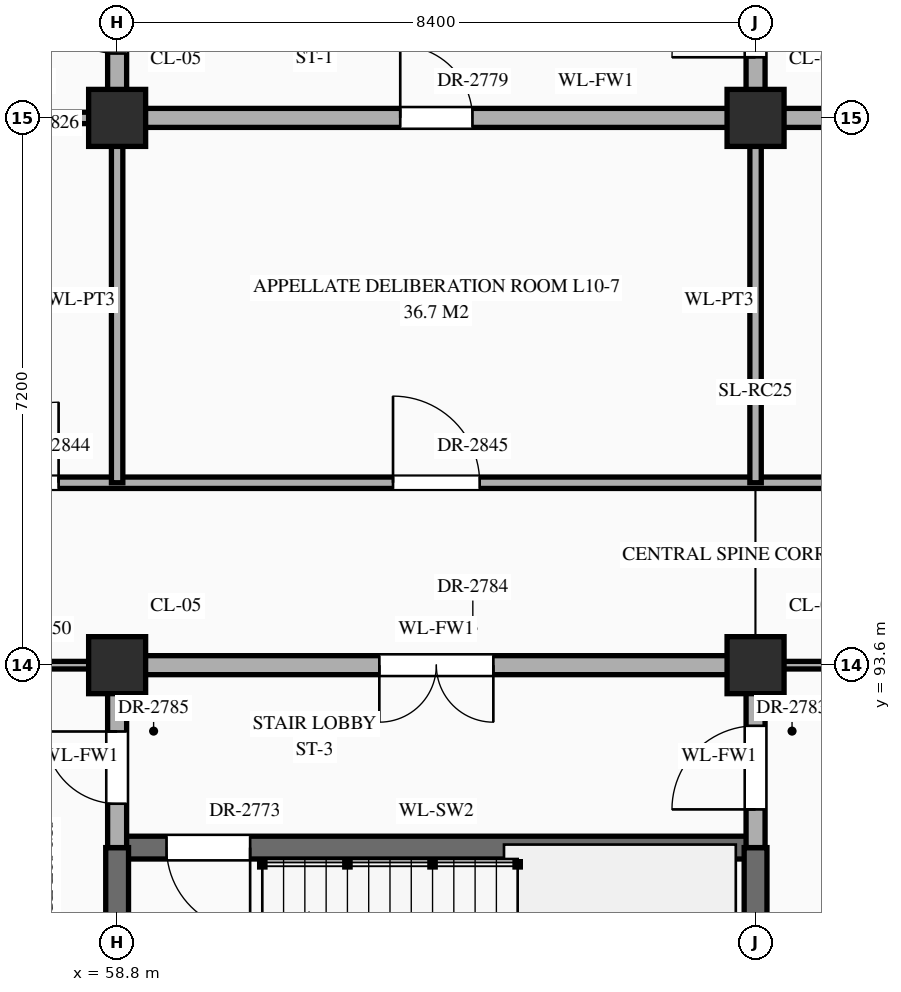
"""IFC4 building model, lengths in metres.
Left out: names, types, materials, properties, quantities, classifications, styles, units other than length and angle.
Written with IfcOpenShell. Run it as: python <this file> out.ifc"""

import sys

from ifc_helpers import new_model, si_unit, direction, frame, frame_2d, origin, origin_2d, place, context, subcontext, project, spatial, rectangle, extrude, element, fill, save


model = new_model("IFC4")
c1 = context("Model", 3, precision=1e-05, world=origin(), true_north=direction((0.0, 1.0)))
c2 = subcontext(c1, "Body", "Model", "MODEL_VIEW")
j1 = project(units=[si_unit("LENGTHUNIT", "METRE"), si_unit("PLANEANGLEUNIT", "RADIAN")], contexts=[c1])
p1 = place(None, origin())
s1 = spatial("IfcSite", under=j1, at=p1, CompositionType="ELEMENT")
p2 = place(p1, origin())
s2 = spatial("IfcBuilding", under=s1, at=p2, CompositionType="ELEMENT")
p3 = place(p2, frame((0.0, 0.0, 43.5)))
s3 = spatial("IfcBuildingStorey", under=s2, at=p3, CompositionType="ELEMENT", Elevation=43.5)
for number, where, z_axis, x_axis in (
    (1, (58.8, 93.6, 0.0), (0.0, 0.0, 1.0), (1.0, 0.0, 0.0)),
    (2, (58.8, 100.8, 0.0), (0.0, 0.0, 1.0), (1.0, 0.0, 0.0)),
    (3, (67.2, 93.6, 0.0), (0.0, 0.0, 1.0), (1.0, 0.0, 0.0)),
    (4, (67.2, 100.8, 0.0), (0.0, 0.0, 1.0), (1.0, 0.0, 0.0)),
):
    element("IfcColumn", number, at=place(p3, frame(where, z_axis=z_axis, x_axis=x_axis)), inside=s3, PredefinedType="COLUMN", context=c2, shape_type="SweptSolid", body=[
        extrude(rectangle(XDim=0.75, YDim=0.75, at=origin_2d()), origin(), (0.0, 0.0, 1.0), 4.2),
    ])
p4 = place(p3, frame((58.8, 91.2, 0.0), z_axis=(0.0, 0.0, 1.0), x_axis=(1.0, 0.0, 0.0)))
e5 = element("IfcWall", 5, at=p4, inside=s3, PredefinedType="SHEAR", context=c2, shape_type="SweptSolid", body=[
    extrude(rectangle(XDim=8.4, YDim=0.3, at=frame_2d((4.2, 0.0))), origin(), (0.0, 0.0, 1.0), 3.95),
])
p5 = place(p4, frame((0.65, 0.0, 0.0)))
e6 = element("IfcOpeningElement", 6, at=p5, cuts=e5, PredefinedType="OPENING", context=c2, shape_type="SweptSolid", body=[
    extrude(rectangle(XDim=1.1, YDim=2.2, at=frame_2d((0.55, 1.1))), frame((0.0, 0.162, 0.0), z_axis=(0.0, -1.0, 0.0), x_axis=(1.0, 0.0, 0.0)), (0.0, 0.0, 1.0), 0.324),
])
p6 = place(p3, frame((50.4, 93.6, 0.0), z_axis=(0.0, 0.0, 1.0), x_axis=(1.0, 0.0, 0.0)))
e7 = element("IfcWall", 7, at=p6, inside=s3, PredefinedType="STANDARD", context=c2, shape_type="SweptSolid", body=[
    extrude(rectangle(XDim=8.4, YDim=0.1, at=frame_2d((4.2, 0.0))), origin(), (0.0, 0.0, 1.0), 3.1),
])
p7 = place(p6, frame((1.087, 0.0, 0.0)))
e8 = element("IfcOpeningElement", 8, at=p7, cuts=e7, PredefinedType="OPENING", context=c2, shape_type="SweptSolid", body=[
    extrude(rectangle(XDim=0.92, YDim=2.15, at=frame_2d((0.46, 1.075))), frame((0.0, 0.062, 0.0), z_axis=(0.0, -1.0, 0.0), x_axis=(1.0, 0.0, 0.0)), (0.0, 0.0, 1.0), 0.124),
])
p8 = place(p6, frame((3.72, 0.0, 0.0)))
e9 = element("IfcOpeningElement", 9, at=p8, cuts=e7, PredefinedType="OPENING", context=c2, shape_type="SweptSolid", body=[
    extrude(rectangle(XDim=0.96, YDim=2.2, at=frame_2d((0.48, 1.1))), frame((0.0, 0.062, 0.0), z_axis=(0.0, -1.0, 0.0), x_axis=(1.0, 0.0, 0.0)), (0.0, 0.0, 1.0), 0.124),
])
p9 = place(p6, frame((6.353, 0.0, 0.0)))
e10 = element("IfcOpeningElement", 10, at=p9, cuts=e7, PredefinedType="OPENING", context=c2, shape_type="SweptSolid", body=[
    extrude(rectangle(XDim=1.0, YDim=2.25, at=frame_2d((0.5, 1.125))), frame((0.0, 0.062, 0.0), z_axis=(0.0, -1.0, 0.0), x_axis=(1.0, 0.0, 0.0)), (0.0, 0.0, 1.0), 0.124),
])
p10 = place(p3, frame((58.8, 93.6, 0.0), z_axis=(0.0, 0.0, 1.0), x_axis=(1.0, 0.0, 0.0)))
e11 = element("IfcWall", 11, at=p10, inside=s3, PredefinedType="STANDARD", context=c2, shape_type="SweptSolid", body=[
    extrude(rectangle(XDim=8.4, YDim=0.25, at=frame_2d((4.2, 0.0))), origin(), (0.0, 0.0, 1.0), 3.1),
])
p11 = place(p10, frame((3.45, 0.0, 0.0)))
e12 = element("IfcOpeningElement", 12, at=p11, cuts=e11, PredefinedType="OPENING", context=c2, shape_type="SweptSolid", body=[
    extrude(rectangle(XDim=1.5, YDim=2.25, at=frame_2d((0.75, 1.125))), frame((0.0, 0.137, 0.0), z_axis=(0.0, -1.0, 0.0), x_axis=(1.0, 0.0, 0.0)), (0.0, 0.0, 1.0), 0.274),
])
p12 = place(p3, frame((67.2, 93.6, 0.0), z_axis=(0.0, 0.0, 1.0), x_axis=(1.0, 0.0, 0.0)))
e13 = element("IfcWall", 13, at=p12, inside=s3, PredefinedType="STANDARD", context=c2, shape_type="SweptSolid", body=[
    extrude(rectangle(XDim=33.6, YDim=0.1, at=frame_2d((16.8, 0.0))), origin(), (0.0, 0.0, 1.0), 3.1),
])
p13 = place(p12, frame((3.35, 0.0, 0.0)))
e14 = element("IfcOpeningElement", 14, at=p13, cuts=e13, PredefinedType="OPENING", context=c2, shape_type="SweptSolid", body=[
    extrude(rectangle(XDim=1.7, YDim=2.45, at=frame_2d((0.85, 1.225))), frame((0.0, 0.062, 0.0), z_axis=(0.0, -1.0, 0.0), x_axis=(1.0, 0.0, 0.0)), (0.0, 0.0, 1.0), 0.124),
])
p14 = place(p12, frame((28.675, 0.0, 0.0)))
e15 = element("IfcOpeningElement", 15, at=p14, cuts=e13, PredefinedType="OPENING", context=c2, shape_type="SweptSolid", body=[
    extrude(rectangle(XDim=1.45, YDim=2.3, at=frame_2d((0.725, 1.15))), frame((0.0, 0.062, 0.0), z_axis=(0.0, -1.0, 0.0), x_axis=(1.0, 0.0, 0.0)), (0.0, 0.0, 1.0), 0.124),
])
p15 = place(p12, frame((11.75, 0.0, 0.0)))
e16 = element("IfcOpeningElement", 16, at=p15, cuts=e13, PredefinedType="OPENING", context=c2, shape_type="SweptSolid", body=[
    extrude(rectangle(XDim=1.7, YDim=2.45, at=frame_2d((0.85, 1.225))), frame((0.0, 0.062, 0.0), z_axis=(0.0, -1.0, 0.0), x_axis=(1.0, 0.0, 0.0)), (0.0, 0.0, 1.0), 0.124),
])
p16 = place(p12, frame((17.837, 0.0, 0.0)))
e17 = element("IfcOpeningElement", 17, at=p16, cuts=e13, PredefinedType="OPENING", context=c2, shape_type="SweptSolid", body=[
    extrude(rectangle(XDim=1.02, YDim=2.4, at=frame_2d((0.51, 1.2))), frame((0.0, 0.062, 0.0), z_axis=(0.0, -1.0, 0.0), x_axis=(1.0, 0.0, 0.0)), (0.0, 0.0, 1.0), 0.124),
])
p17 = place(p12, frame((20.47, 0.0, 0.0)))
e18 = element("IfcOpeningElement", 18, at=p17, cuts=e13, PredefinedType="OPENING", context=c2, shape_type="SweptSolid", body=[
    extrude(rectangle(XDim=1.06, YDim=2.4, at=frame_2d((0.53, 1.2))), frame((0.0, 0.062, 0.0), z_axis=(0.0, -1.0, 0.0), x_axis=(1.0, 0.0, 0.0)), (0.0, 0.0, 1.0), 0.124),
])
p18 = place(p12, frame((23.083, 0.0, 0.0)))
e19 = element("IfcOpeningElement", 19, at=p18, cuts=e13, PredefinedType="OPENING", context=c2, shape_type="SweptSolid", body=[
    extrude(rectangle(XDim=1.14, YDim=2.4, at=frame_2d((0.57, 1.2))), frame((0.0, 0.062, 0.0), z_axis=(0.0, -1.0, 0.0), x_axis=(1.0, 0.0, 0.0)), (0.0, 0.0, 1.0), 0.124),
])
p19 = place(p3, frame((56.2, 96.0, 0.0), z_axis=(0.0, 0.0, 1.0), x_axis=(1.0, 0.0, 0.0)))
e20 = element("IfcWall", 20, at=p19, inside=s3, PredefinedType="STANDARD", context=c2, shape_type="SweptSolid", body=[
    extrude(rectangle(XDim=27.8, YDim=0.15, at=frame_2d((13.9, 0.0))), origin(), (0.0, 0.0, 1.0), 3.95),
])
p20 = place(p19, frame((0.77, 0.0, 0.0)))
e21 = element("IfcOpeningElement", 21, at=p20, cuts=e20, PredefinedType="OPENING", context=c2, shape_type="SweptSolid", body=[
    extrude(rectangle(XDim=1.06, YDim=2.4, at=frame_2d((0.53, 1.2))), frame((0.0, 0.087, 0.0), z_axis=(0.0, -1.0, 0.0), x_axis=(1.0, 0.0, 0.0)), (0.0, 0.0, 1.0), 0.174),
])
p21 = place(p19, frame((6.23, 0.0, 0.0)))
e22 = element("IfcOpeningElement", 22, at=p21, cuts=e20, PredefinedType="OPENING", context=c2, shape_type="SweptSolid", body=[
    extrude(rectangle(XDim=1.14, YDim=2.4, at=frame_2d((0.57, 1.2))), frame((0.0, 0.087, 0.0), z_axis=(0.0, -1.0, 0.0), x_axis=(1.0, 0.0, 0.0)), (0.0, 0.0, 1.0), 0.174),
])
p22 = place(p19, frame((14.75, 0.0, 0.0)))
e23 = element("IfcOpeningElement", 23, at=p22, cuts=e20, PredefinedType="OPENING", context=c2, shape_type="SweptSolid", body=[
    extrude(rectangle(XDim=0.9, YDim=2.15, at=frame_2d((0.45, 1.075))), frame((0.0, 0.087, 0.0), z_axis=(0.0, -1.0, 0.0), x_axis=(1.0, 0.0, 0.0)), (0.0, 0.0, 1.0), 0.174),
])
p23 = place(p19, frame((23.17, 0.0, 0.0)))
e24 = element("IfcOpeningElement", 24, at=p23, cuts=e20, PredefinedType="OPENING", context=c2, shape_type="SweptSolid", body=[
    extrude(rectangle(XDim=0.86, YDim=2.1, at=frame_2d((0.43, 1.05))), frame((0.0, 0.087, 0.0), z_axis=(0.0, -1.0, 0.0), x_axis=(1.0, 0.0, 0.0)), (0.0, 0.0, 1.0), 0.174),
])
p24 = place(p3, frame((56.2, 100.8, 0.0), z_axis=(0.0, 0.0, 1.0), x_axis=(1.0, 0.0, 0.0)))
e25 = element("IfcWall", 25, at=p24, inside=s3, PredefinedType="STANDARD", context=c2, shape_type="SweptSolid", body=[
    extrude(rectangle(XDim=2.6, YDim=0.15, at=frame_2d((1.3, 0.0))), origin(), (0.0, 0.0, 1.0), 3.1),
])
p25 = place(p24, frame((0.643, 0.0, 0.0)))
e26 = element("IfcOpeningElement", 26, at=p25, cuts=e25, PredefinedType="OPENING", context=c2, shape_type="SweptSolid", body=[
    extrude(rectangle(XDim=1.02, YDim=2.4, at=frame_2d((0.51, 1.2))), frame((0.0, 0.087, 0.0), z_axis=(0.0, -1.0, 0.0), x_axis=(1.0, 0.0, 0.0)), (0.0, 0.0, 1.0), 0.174),
])
p26 = place(p3, frame((58.8, 100.8, 0.0), z_axis=(0.0, 0.0, 1.0), x_axis=(1.0, 0.0, 0.0)))
e27 = element("IfcWall", 27, at=p26, inside=s3, PredefinedType="STANDARD", context=c2, shape_type="SweptSolid", body=[
    extrude(rectangle(XDim=12.6, YDim=0.25, at=frame_2d((6.3, 0.0))), origin(), (0.0, 0.0, 1.0), 3.1),
])
p27 = place(p26, frame((3.725, 0.0, 0.0)))
e28 = element("IfcOpeningElement", 28, at=p27, cuts=e27, PredefinedType="OPENING", context=c2, shape_type="SweptSolid", body=[
    extrude(rectangle(XDim=0.95, YDim=2.15, at=frame_2d((0.475, 1.075))), frame((0.0, 0.137, 0.0), z_axis=(0.0, -1.0, 0.0), x_axis=(1.0, 0.0, 0.0)), (0.0, 0.0, 1.0), 0.274),
])
p28 = place(p3, frame((58.8, 86.4, 0.0), z_axis=(0.0, 0.0, 1.0), x_axis=(0.0, 1.0, 0.0)))
e29 = element("IfcWall", 29, at=p28, inside=s3, PredefinedType="SHEAR", context=c2, shape_type="SweptSolid", body=[
    extrude(rectangle(XDim=4.8, YDim=0.3, at=frame_2d((2.4, 0.0))), origin(), (0.0, 0.0, 1.0), 3.95),
])
p29 = place(p3, frame((58.8, 91.2, 0.0), z_axis=(0.0, 0.0, 1.0), x_axis=(0.0, 1.0, 0.0)))
e30 = element("IfcWall", 30, at=p29, inside=s3, PredefinedType="STANDARD", context=c2, shape_type="SweptSolid", body=[
    extrude(rectangle(XDim=2.4, YDim=0.25, at=frame_2d((1.2, 0.0))), origin(), (0.0, 0.0, 1.0), 3.2),
])
p30 = place(p29, frame((0.577, 0.0, 0.0)))
e31 = element("IfcOpeningElement", 31, at=p30, cuts=e30, PredefinedType="OPENING", context=c2, shape_type="SweptSolid", body=[
    extrude(rectangle(XDim=0.95, YDim=2.15, at=frame_2d((0.475, 1.075))), frame((0.0, 0.137, 0.0), z_axis=(0.0, -1.0, 0.0), x_axis=(1.0, 0.0, 0.0)), (0.0, 0.0, 1.0), 0.274),
])
p31 = place(p3, frame((58.8, 96.0, 0.0), z_axis=(0.0, 0.0, 1.0), x_axis=(0.0, 1.0, 0.0)))
e32 = element("IfcWall", 32, at=p31, inside=s3, PredefinedType="STANDARD", context=c2, shape_type="SweptSolid", body=[
    extrude(rectangle(XDim=4.8, YDim=0.15, at=frame_2d((2.4, 0.0))), origin(), (0.0, 0.0, 1.0), 3.2),
])
p32 = place(p3, frame((58.8, 100.8, 0.0), z_axis=(0.0, 0.0, 1.0), x_axis=(0.0, 1.0, 0.0)))
e33 = element("IfcWall", 33, at=p32, inside=s3, PredefinedType="STANDARD", context=c2, shape_type="SweptSolid", body=[
    extrude(rectangle(XDim=2.4, YDim=0.25, at=frame_2d((1.2, 0.0))), origin(), (0.0, 0.0, 1.0), 3.2),
])
p33 = place(p32, frame((0.847, 0.0, 0.0)))
e34 = element("IfcOpeningElement", 34, at=p33, cuts=e33, PredefinedType="OPENING", context=c2, shape_type="SweptSolid", body=[
    extrude(rectangle(XDim=1.0, YDim=2.2, at=frame_2d((0.5, 1.1))), frame((0.0, 0.137, 0.0), z_axis=(0.0, -1.0, 0.0), x_axis=(1.0, 0.0, 0.0)), (0.0, 0.0, 1.0), 0.274),
])
p34 = place(p3, frame((67.2, 89.2, 0.0), z_axis=(0.0, 0.0, 1.0), x_axis=(0.0, 1.0, 0.0)))
e35 = element("IfcWall", 35, at=p34, inside=s3, PredefinedType="SHEAR", context=c2, shape_type="SweptSolid", body=[
    extrude(rectangle(XDim=2.0, YDim=0.3, at=frame_2d((1.0, 0.0))), origin(), (0.0, 0.0, 1.0), 3.95),
])
p35 = place(p3, frame((67.2, 91.2, 0.0), z_axis=(0.0, 0.0, 1.0), x_axis=(0.0, 1.0, 0.0)))
e36 = element("IfcWall", 36, at=p35, inside=s3, PredefinedType="STANDARD", context=c2, shape_type="SweptSolid", body=[
    extrude(rectangle(XDim=2.4, YDim=0.25, at=frame_2d((1.2, 0.0))), origin(), (0.0, 0.0, 1.0), 3.2),
])
p36 = place(p35, frame((0.502, 0.0, 0.0)))
e37 = element("IfcOpeningElement", 37, at=p36, cuts=e36, PredefinedType="OPENING", context=c2, shape_type="SweptSolid", body=[
    extrude(rectangle(XDim=1.1, YDim=2.2, at=frame_2d((0.55, 1.1))), frame((0.0, 0.137, 0.0), z_axis=(0.0, -1.0, 0.0), x_axis=(1.0, 0.0, 0.0)), (0.0, 0.0, 1.0), 0.274),
])
p37 = place(p3, frame((67.2, 96.0, 0.0), z_axis=(0.0, 0.0, 1.0), x_axis=(0.0, 1.0, 0.0)))
e38 = element("IfcWall", 38, at=p37, inside=s3, PredefinedType="STANDARD", context=c2, shape_type="SweptSolid", body=[
    extrude(rectangle(XDim=4.8, YDim=0.15, at=frame_2d((2.4, 0.0))), origin(), (0.0, 0.0, 1.0), 3.2),
])
p38 = place(p3, frame((67.2, 100.8, 0.0), z_axis=(0.0, 0.0, 1.0), x_axis=(0.0, 1.0, 0.0)))
e39 = element("IfcWall", 39, at=p38, inside=s3, PredefinedType="STANDARD", context=c2, shape_type="SweptSolid", body=[
    extrude(rectangle(XDim=2.4, YDim=0.25, at=frame_2d((1.2, 0.0))), origin(), (0.0, 0.0, 1.0), 3.2),
])
p39 = place(p38, frame((0.798, 0.0, 0.0)))
e40 = element("IfcOpeningElement", 40, at=p39, cuts=e39, PredefinedType="OPENING", context=c2, shape_type="SweptSolid", body=[
    extrude(rectangle(XDim=1.1, YDim=2.2, at=frame_2d((0.55, 1.1))), frame((0.0, 0.137, 0.0), z_axis=(0.0, -1.0, 0.0), x_axis=(1.0, 0.0, 0.0)), (0.0, 0.0, 1.0), 0.274),
])
p40 = place(p5, frame((1.1, 0.0, 0.0), z_axis=(0.0, 0.0, 1.0), x_axis=(-1.0, 0.0, 0.0)))
e41 = element("IfcDoor", 41, at=p40, inside=s3, OperationType="SINGLE_SWING_LEFT", PredefinedType="DOOR", context=c2, shape_type="SweptSolid", body=[
    extrude(rectangle(XDim=1.1, YDim=2.2, at=frame_2d((0.55, 1.1))), frame((0.0, 0.025, 0.0), z_axis=(0.0, -1.0, 0.0), x_axis=(1.0, 0.0, 0.0)), (0.0, 0.0, 1.0), 0.05),
])
fill(e6, e41)
p41 = place(p39, origin())
e42 = element("IfcDoor", 42, at=p41, inside=s3, OperationType="SINGLE_SWING_LEFT", PredefinedType="DOOR", context=c2, shape_type="SweptSolid", body=[
    extrude(rectangle(XDim=1.1, YDim=2.2, at=frame_2d((0.55, 1.1))), frame((0.0, 0.025, 0.0), z_axis=(0.0, -1.0, 0.0), x_axis=(1.0, 0.0, 0.0)), (0.0, 0.0, 1.0), 0.05),
])
fill(e40, e42)
p42 = place(p33, origin())
e43 = element("IfcDoor", 43, at=p42, inside=s3, OperationType="SINGLE_SWING_RIGHT", PredefinedType="DOOR", context=c2, shape_type="SweptSolid", body=[
    extrude(rectangle(XDim=1.0, YDim=2.2, at=frame_2d((0.5, 1.1))), frame((0.0, 0.025, 0.0), z_axis=(0.0, -1.0, 0.0), x_axis=(1.0, 0.0, 0.0)), (0.0, 0.0, 1.0), 0.05),
])
fill(e34, e43)
p43 = place(p27, origin())
e44 = element("IfcDoor", 44, at=p43, inside=s3, OperationType="SINGLE_SWING_LEFT", PredefinedType="DOOR", context=c2, shape_type="SweptSolid", body=[
    extrude(rectangle(XDim=0.95, YDim=2.15, at=frame_2d((0.475, 1.075))), frame((0.0, 0.025, 0.0), z_axis=(0.0, -1.0, 0.0), x_axis=(1.0, 0.0, 0.0)), (0.0, 0.0, 1.0), 0.05),
])
fill(e28, e44)
p44 = place(p36, origin())
e45 = element("IfcDoor", 45, at=p44, inside=s3, OperationType="SINGLE_SWING_LEFT", PredefinedType="DOOR", context=c2, shape_type="SweptSolid", body=[
    extrude(rectangle(XDim=1.1, YDim=2.2, at=frame_2d((0.55, 1.1))), frame((0.0, 0.025, 0.0), z_axis=(0.0, -1.0, 0.0), x_axis=(1.0, 0.0, 0.0)), (0.0, 0.0, 1.0), 0.05),
])
fill(e37, e45)
p45 = place(p11, frame((1.5, 0.0, 0.0), z_axis=(0.0, 0.0, 1.0), x_axis=(-1.0, 0.0, 0.0)))
e46 = element("IfcDoor", 46, at=p45, inside=s3, OperationType="DOUBLE_DOOR_SINGLE_SWING", PredefinedType="DOOR", context=c2, shape_type="SweptSolid", body=[
    extrude(rectangle(XDim=1.5, YDim=2.25, at=frame_2d((0.75, 1.125))), frame((0.0, 0.025, 0.0), z_axis=(0.0, -1.0, 0.0), x_axis=(1.0, 0.0, 0.0)), (0.0, 0.0, 1.0), 0.05),
])
fill(e12, e46)
p46 = place(p30, origin())
e47 = element("IfcDoor", 47, at=p46, inside=s3, OperationType="SINGLE_SWING_RIGHT", PredefinedType="DOOR", context=c2, shape_type="SweptSolid", body=[
    extrude(rectangle(XDim=0.95, YDim=2.15, at=frame_2d((0.475, 1.075))), frame((0.0, 0.025, 0.0), z_axis=(0.0, -1.0, 0.0), x_axis=(1.0, 0.0, 0.0)), (0.0, 0.0, 1.0), 0.05),
])
fill(e31, e47)
p47 = place(p20, origin())
e48 = element("IfcDoor", 48, at=p47, inside=s3, OperationType="SINGLE_SWING_RIGHT", PredefinedType="DOOR", context=c2, shape_type="SweptSolid", body=[
    extrude(rectangle(XDim=1.06, YDim=2.4, at=frame_2d((0.53, 1.2))), frame((0.0, 0.025, 0.0), z_axis=(0.0, -1.0, 0.0), x_axis=(1.0, 0.0, 0.0)), (0.0, 0.0, 1.0), 0.05),
])
fill(e21, e48)
p48 = place(p21, origin())
e49 = element("IfcDoor", 49, at=p48, inside=s3, OperationType="SINGLE_SWING_LEFT", PredefinedType="DOOR", context=c2, shape_type="SweptSolid", body=[
    extrude(rectangle(XDim=1.14, YDim=2.4, at=frame_2d((0.57, 1.2))), frame((0.0, 0.025, 0.0), z_axis=(0.0, -1.0, 0.0), x_axis=(1.0, 0.0, 0.0)), (0.0, 0.0, 1.0), 0.05),
])
fill(e22, e49)
save(model, sys.argv[1])
